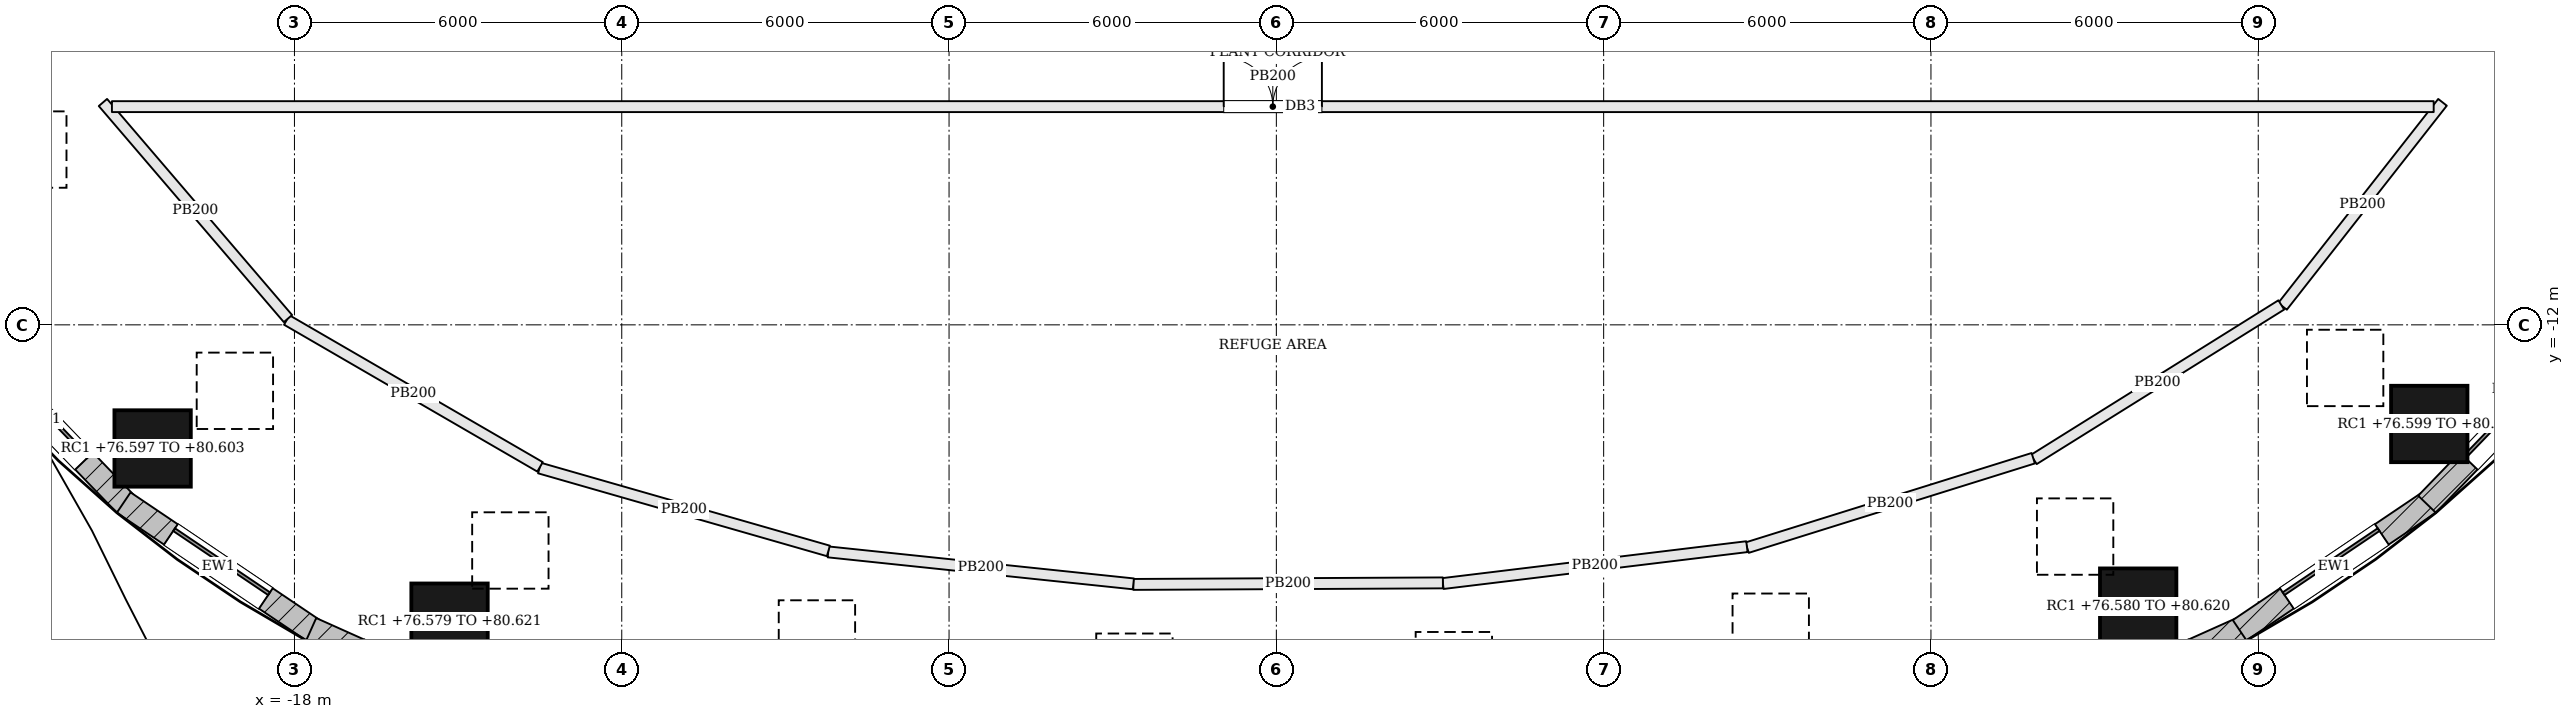
"""IFC4 building model, lengths in metres.
Left out: names, types, materials, properties, quantities, classifications, styles, units other than length and angle.
Written with IfcOpenShell. Run it as: python <this file> out.ifc"""

import sys

from ifc_helpers import new_model, si_unit, direction, frame, frame_2d, origin, origin_2d, place, context, subcontext, project, spatial, rectangle, extrude, element, fill, save


model = new_model("IFC4")
c1 = context("Model", 3, precision=1e-05, world=origin(), true_north=direction((0.0, 1.0)))
c2 = subcontext(c1, "Body", "Model", "MODEL_VIEW")
j1 = project(units=[si_unit("LENGTHUNIT", "METRE"), si_unit("PLANEANGLEUNIT", "RADIAN")], contexts=[c1])
p1 = place(None, origin())
s1 = spatial("IfcSite", under=j1, at=p1, CompositionType="ELEMENT")
p2 = place(p1, origin())
s2 = spatial("IfcBuilding", under=s1, at=p2, CompositionType="ELEMENT")
p3 = place(p2, frame((0.0, 0.0, 77.1)))
s3 = spatial("IfcBuildingStorey", under=s2, at=p3, CompositionType="ELEMENT", Elevation=77.1)
p4 = place(p3, frame((-24.676, -9.483, -0.49), z_axis=(0.406404807836, 0.157350047865, 0.900042273787), x_axis=(-0.361058075799, 0.932543331915, 0.0)))
e1 = element("IfcColumn", 1, at=p4, inside=s3, PredefinedType="COLUMN", context=c2, shape_type="SweptSolid", body=[
    extrude(rectangle(XDim=1.4, YDim=1.4, at=origin_2d()), origin(), (0.0, 0.0, 1.0), 4.422),
])
p5 = place(p3, frame((-20.6, -14.266, -0.503), z_axis=(0.342028722552, 0.239757870916, 0.908588199507), x_axis=(-0.574004932865, 0.818851840718, 0.0)))
e2 = element("IfcColumn", 2, at=p5, inside=s3, PredefinedType="COLUMN", context=c2, shape_type="SweptSolid", body=[
    extrude(rectangle(XDim=1.4, YDim=1.4, at=origin_2d()), origin(), (0.0, 0.0, 1.0), 4.409),
])
p6 = place(p3, frame((-15.157, -17.441, -0.521), z_axis=(0.253907371745, 0.297161134657, 0.920448970135), x_axis=(-0.760269764075, 0.649607485974, 0.0)))
e3 = element("IfcColumn", 3, at=p6, inside=s3, PredefinedType="COLUMN", context=c2, shape_type="SweptSolid", body=[
    extrude(rectangle(XDim=1.4, YDim=1.4, at=origin_2d()), origin(), (0.0, 0.0, 1.0), 4.391),
])
p7 = place(p3, frame((-9.094, -19.192, -0.541), z_axis=(0.15334867667, 0.329320740959, 0.931682366978), x_axis=(-0.906535510121, 0.422129564104, 0.0)))
e4 = element("IfcColumn", 4, at=p7, inside=s3, PredefinedType="COLUMN", context=c2, shape_type="SweptSolid", body=[
    extrude(rectangle(XDim=1.4, YDim=1.4, at=origin_2d()), origin(), (0.0, 0.0, 1.0), 4.381),
])
p8 = place(p3, frame((-2.811, -19.854, -0.553), z_axis=(0.047767571246, 0.341962239014, 0.938498847216), x_axis=(-0.990384307253, 0.138343499838, 0.0)))
e5 = element("IfcColumn", 5, at=p8, inside=s3, PredefinedType="COLUMN", context=c2, shape_type="SweptSolid", body=[
    extrude(rectangle(XDim=1.4, YDim=1.4, at=origin_2d()), origin(), (0.0, 0.0, 1.0), 4.375),
])
p9 = place(p3, frame((3.509, -19.824, -0.553), z_axis=(-0.058291782188, 0.341327670053, 0.938135112756), x_axis=(-0.985728602585, -0.168342276467, 0.0)))
e6 = element("IfcColumn", 6, at=p9, inside=s3, PredefinedType="COLUMN", context=c2, shape_type="SweptSolid", body=[
    extrude(rectangle(XDim=1.4, YDim=1.4, at=origin_2d()), origin(), (0.0, 0.0, 1.0), 4.377),
])
p10 = place(p3, frame((9.78, -19.058, -0.539), z_axis=(-0.163654041419, 0.327085196844, 0.930716191292), x_axis=(-0.894305276314, -0.447457341829, 0.0)))
e7 = element("IfcColumn", 7, at=p10, inside=s3, PredefinedType="COLUMN", context=c2, shape_type="SweptSolid", body=[
    extrude(rectangle(XDim=1.4, YDim=1.4, at=origin_2d()), origin(), (0.0, 0.0, 1.0), 4.381),
])
p11 = place(p3, frame((15.799, -17.165, -0.52), z_axis=(-0.263090632585, 0.292205625505, 0.919455921439), x_axis=(-0.743160626591, -0.669113057028, 0.0)))
e8 = element("IfcColumn", 8, at=p11, inside=s3, PredefinedType="COLUMN", context=c2, shape_type="SweptSolid", body=[
    extrude(rectangle(XDim=1.4, YDim=1.4, at=origin_2d()), origin(), (0.0, 0.0, 1.0), 4.394),
])
p12 = place(p3, frame((21.135, -13.817, -0.501), z_axis=(-0.349660781427, 0.232848835763, 0.907479342804), x_axis=(-0.554274366932, -0.832334023191, 0.0)))
e9 = element("IfcColumn", 9, at=p12, inside=s3, PredefinedType="COLUMN", context=c2, shape_type="SweptSolid", body=[
    extrude(rectangle(XDim=1.4, YDim=1.4, at=origin_2d()), origin(), (0.0, 0.0, 1.0), 4.41),
])
p13 = place(p3, frame((-24.077, -12.194, 0.0), z_axis=(0.0, 0.0, 1.0), x_axis=(0.69406513137, -0.719912212298, 0.0)))
e10 = element("IfcWall", 10, at=p13, inside=s3, PredefinedType="SOLIDWALL", context=c2, shape_type="SweptSolid", body=[
    extrude(rectangle(XDim=4.298, YDim=0.45, at=frame_2d((2.149, 0.0))), origin(), (0.0, 0.0, 1.0), 4.3),
])
p14 = place(p13, frame((1.099, 0.0, 1.2)))
e11 = element("IfcOpeningElement", 11, at=p14, cuts=e10, PredefinedType="OPENING", context=c2, shape_type="SweptSolid", body=[
    extrude(rectangle(XDim=2.1, YDim=1.8, at=frame_2d((1.05, 0.9))), frame((0.0, 0.235, 0.0), z_axis=(0.0, -1.0, 0.0), x_axis=(1.0, 0.0, 0.0)), (0.0, 0.0, 1.0), 0.47),
])
p15 = place(p3, frame((-21.13, -15.258, 0.0), z_axis=(0.0, 0.0, 1.0), x_axis=(0.829077786947, -0.559133278557, 0.0)))
e12 = element("IfcWall", 12, at=p15, inside=s3, PredefinedType="SOLIDWALL", context=c2, shape_type="SweptSolid", body=[
    extrude(rectangle(XDim=4.187, YDim=0.45, at=frame_2d((2.093, 0.0))), origin(), (0.0, 0.0, 1.0), 4.3),
])
p16 = place(p15, frame((1.043, 0.0, 1.2)))
e13 = element("IfcOpeningElement", 13, at=p16, cuts=e12, PredefinedType="OPENING", context=c2, shape_type="SweptSolid", body=[
    extrude(rectangle(XDim=2.1, YDim=1.8, at=frame_2d((1.05, 0.9))), frame((0.0, 0.235, 0.0), z_axis=(0.0, -1.0, 0.0), x_axis=(1.0, 0.0, 0.0)), (0.0, 0.0, 1.0), 0.47),
])
p17 = place(p3, frame((-17.693, -17.58, 0.0), z_axis=(0.0, 0.0, 1.0), x_axis=(0.912580432801, -0.408897240966, 0.0)))
e14 = element("IfcWall", 14, at=p17, inside=s3, PredefinedType="SOLIDWALL", context=c2, shape_type="SweptSolid", body=[
    extrude(rectangle(XDim=4.021, YDim=0.45, at=frame_2d((2.01, 0.0))), origin(), (0.0, 0.0, 1.0), 4.3),
])
p18 = place(p17, frame((0.96, 0.0, 1.2)))
e15 = element("IfcOpeningElement", 15, at=p18, cuts=e14, PredefinedType="OPENING", context=c2, shape_type="SweptSolid", body=[
    extrude(rectangle(XDim=2.1, YDim=1.8, at=frame_2d((1.05, 0.9))), frame((0.0, 0.235, 0.0), z_axis=(0.0, -1.0, 0.0), x_axis=(1.0, 0.0, 0.0)), (0.0, 0.0, 1.0), 0.47),
])
p19 = place(p3, frame((14.024, -19.224, 0.0), z_axis=(0.0, 0.0, 1.0), x_axis=(0.912580432801, 0.408897240966, 0.0)))
e16 = element("IfcWall", 16, at=p19, inside=s3, PredefinedType="SOLIDWALL", context=c2, shape_type="SweptSolid", body=[
    extrude(rectangle(XDim=4.021, YDim=0.45, at=frame_2d((2.01, 0.0))), origin(), (0.0, 0.0, 1.0), 4.3),
])
p20 = place(p19, frame((0.96, 0.0, 1.2)))
e17 = element("IfcOpeningElement", 17, at=p20, cuts=e16, PredefinedType="OPENING", context=c2, shape_type="SweptSolid", body=[
    extrude(rectangle(XDim=2.1, YDim=1.8, at=frame_2d((1.05, 0.9))), frame((0.0, 0.235, 0.0), z_axis=(0.0, -1.0, 0.0), x_axis=(1.0, 0.0, 0.0)), (0.0, 0.0, 1.0), 0.47),
])
p21 = place(p3, frame((17.659, -17.598, 0.0), z_axis=(0.0, 0.0, 1.0), x_axis=(0.829077786947, 0.559133278557, 0.0)))
e18 = element("IfcWall", 18, at=p21, inside=s3, PredefinedType="SOLIDWALL", context=c2, shape_type="SweptSolid", body=[
    extrude(rectangle(XDim=4.187, YDim=0.45, at=frame_2d((2.093, 0.0))), origin(), (0.0, 0.0, 1.0), 4.3),
])
p22 = place(p21, frame((1.043, 0.0, 1.2)))
e19 = element("IfcOpeningElement", 19, at=p22, cuts=e18, PredefinedType="OPENING", context=c2, shape_type="SweptSolid", body=[
    extrude(rectangle(XDim=2.1, YDim=1.8, at=frame_2d((1.05, 0.9))), frame((0.0, 0.235, 0.0), z_axis=(0.0, -1.0, 0.0), x_axis=(1.0, 0.0, 0.0)), (0.0, 0.0, 1.0), 0.47),
])
p23 = place(p3, frame((21.094, -15.288, 0.0), z_axis=(0.0, 0.0, 1.0), x_axis=(0.69406513137, 0.719912212298, 0.0)))
e20 = element("IfcWall", 20, at=p23, inside=s3, PredefinedType="SOLIDWALL", context=c2, shape_type="SweptSolid", body=[
    extrude(rectangle(XDim=4.298, YDim=0.45, at=frame_2d((2.149, 0.0))), origin(), (0.0, 0.0, 1.0), 4.3),
])
p24 = place(p23, frame((1.099, 0.0, 1.2)))
e21 = element("IfcOpeningElement", 21, at=p24, cuts=e20, PredefinedType="OPENING", context=c2, shape_type="SweptSolid", body=[
    extrude(rectangle(XDim=2.1, YDim=1.8, at=frame_2d((1.05, 0.9))), frame((0.0, 0.235, 0.0), z_axis=(0.0, -1.0, 0.0), x_axis=(1.0, 0.0, 0.0)), (0.0, 0.0, 1.0), 0.47),
])
p25 = place(p3, frame((-24.085, -12.294, 4.5), z_axis=(0.0, 0.0, 1.0), x_axis=(0.69408561192, -0.719892466501, 0.0)))
e22 = element("IfcWall", 22, at=p25, inside=s3, PredefinedType="PARAPET", context=c2, shape_type="SweptSolid", body=[
    extrude(rectangle(XDim=2.261, YDim=0.3, at=frame_2d((1.13, 0.0))), origin(), (0.0, 0.0, 1.0), 1.1),
])
p26 = place(p3, frame((21.378, -7.921, 0.0), z_axis=(0.0, 0.0, 1.0), x_axis=(-0.61707944402, -0.786900857649, 0.0)))
e23 = element("IfcWall", 23, at=p26, inside=s3, PredefinedType="PARTITIONING", context=c2, shape_type="SweptSolid", body=[
    extrude(rectangle(XDim=4.753, YDim=0.2, at=frame_2d((2.376, 0.0))), origin(), (0.0, 0.0, 1.0), 4.3),
])
p27 = place(p3, frame((18.422, -11.635, 0.0), z_axis=(0.0, 0.0, 1.0), x_axis=(-0.848223876435, -0.529637853108, 0.0)))
e24 = element("IfcWall", 24, at=p27, inside=s3, PredefinedType="PARTITIONING", context=c2, shape_type="SweptSolid", body=[
    extrude(rectangle(XDim=5.349, YDim=0.2, at=frame_2d((2.674, 0.0))), origin(), (0.0, 0.0, 1.0), 4.3),
])
p28 = place(p3, frame((13.875, -14.445, 0.0), z_axis=(0.0, 0.0, 1.0), x_axis=(-0.954489463941, -0.298244636541, 0.0)))
e25 = element("IfcWall", 25, at=p28, inside=s3, PredefinedType="PARTITIONING", context=c2, shape_type="SweptSolid", body=[
    extrude(rectangle(XDim=5.495, YDim=0.2, at=frame_2d((2.748, 0.0))), origin(), (0.0, 0.0, 1.0), 4.3),
])
p29 = place(p3, frame((8.626, -16.066, 0.0), z_axis=(0.0, 0.0, 1.0), x_axis=(-0.992720392358, -0.120441780942, 0.0)))
e26 = element("IfcWall", 26, at=p29, inside=s3, PredefinedType="PARTITIONING", context=c2, shape_type="SweptSolid", body=[
    extrude(rectangle(XDim=5.613, YDim=0.2, at=frame_2d((2.806, 0.0))), origin(), (0.0, 0.0, 1.0), 4.3),
])
p30 = place(p3, frame((3.053, -16.73, 0.0), z_axis=(0.0, 0.0, 1.0), x_axis=(-0.999987762334, -0.004947239951, 0.0)))
e27 = element("IfcWall", 27, at=p30, inside=s3, PredefinedType="PARTITIONING", context=c2, shape_type="SweptSolid", body=[
    extrude(rectangle(XDim=5.675, YDim=0.2, at=frame_2d((2.837, 0.0))), origin(), (0.0, 0.0, 1.0), 4.3),
])
p31 = place(p3, frame((-2.621, -16.748, 0.0), z_axis=(0.0, 0.0, 1.0), x_axis=(-0.99455907377, 0.104174127222, 0.0)))
e28 = element("IfcWall", 28, at=p31, inside=s3, PredefinedType="PARTITIONING", context=c2, shape_type="SweptSolid", body=[
    extrude(rectangle(XDim=5.625, YDim=0.2, at=frame_2d((2.812, 0.0))), origin(), (0.0, 0.0, 1.0), 4.3),
])
p32 = place(p3, frame((-8.212, -16.144, 0.0), z_axis=(0.0, 0.0, 1.0), x_axis=(-0.961229052449, 0.275751171762, 0.0)))
e29 = element("IfcWall", 29, at=p32, inside=s3, PredefinedType="PARTITIONING", context=c2, shape_type="SweptSolid", body=[
    extrude(rectangle(XDim=5.509, YDim=0.2, at=frame_2d((2.754, 0.0))), origin(), (0.0, 0.0, 1.0), 4.3),
])
p33 = place(p3, frame((-13.498, -14.603, 0.0), z_axis=(0.0, 0.0, 1.0), x_axis=(-0.865099094035, 0.501600994317, 0.0)))
e30 = element("IfcWall", 30, at=p33, inside=s3, PredefinedType="PARTITIONING", context=c2, shape_type="SweptSolid", body=[
    extrude(rectangle(XDim=5.367, YDim=0.2, at=frame_2d((2.684, 0.0))), origin(), (0.0, 0.0, 1.0), 4.3),
])
p34 = place(p3, frame((-18.119, -11.885, 0.0), z_axis=(0.0, 0.0, 1.0), x_axis=(-0.650459744862, 0.759540729858, 0.0)))
e31 = element("IfcWall", 31, at=p34, inside=s3, PredefinedType="PARTITIONING", context=c2, shape_type="SweptSolid", body=[
    extrude(rectangle(XDim=5.215, YDim=0.2, at=frame_2d((2.607, 0.0))), origin(), (0.0, 0.0, 1.0), 4.3),
])
p35 = place(p3, frame((-21.346, -8.0, 0.0), z_axis=(0.0, 0.0, 1.0), x_axis=(1.0, 0.0, 0.0)))
e32 = element("IfcWall", 32, at=p35, inside=s3, PredefinedType="PARTITIONING", context=c2, shape_type="SweptSolid", body=[
    extrude(rectangle(XDim=42.562, YDim=0.2, at=frame_2d((21.281, 0.0))), origin(), (0.0, 0.0, 1.0), 4.3),
])
p36 = place(p35, frame((20.381, 0.0, 0.0)))
e33 = element("IfcOpeningElement", 33, at=p36, cuts=e32, PredefinedType="OPENING", context=c2, shape_type="SweptSolid", body=[
    extrude(rectangle(XDim=1.8, YDim=2.1, at=frame_2d((0.9, 1.05))), frame((0.0, 0.11, 0.0), z_axis=(0.0, -1.0, 0.0), x_axis=(1.0, 0.0, 0.0)), (0.0, 0.0, 1.0), 0.22),
])
p37 = place(p14, origin())
e34 = element("IfcWindow", 34, at=p37, inside=s3, PartitioningType="SINGLE_PANEL", PredefinedType="WINDOW", context=c2, shape_type="SweptSolid", body=[
    extrude(rectangle(XDim=2.1, YDim=1.8, at=frame_2d((1.05, 0.9))), frame((0.0, 0.135, 0.0), z_axis=(0.0, -1.0, 0.0), x_axis=(1.0, 0.0, 0.0)), (0.0, 0.0, 1.0), 0.06),
])
fill(e11, e34)
p38 = place(p16, origin())
e35 = element("IfcWindow", 35, at=p38, inside=s3, PartitioningType="SINGLE_PANEL", PredefinedType="WINDOW", context=c2, shape_type="SweptSolid", body=[
    extrude(rectangle(XDim=2.1, YDim=1.8, at=frame_2d((1.05, 0.9))), frame((0.0, 0.135, 0.0), z_axis=(0.0, -1.0, 0.0), x_axis=(1.0, 0.0, 0.0)), (0.0, 0.0, 1.0), 0.06),
])
fill(e13, e35)
p39 = place(p22, origin())
e36 = element("IfcWindow", 36, at=p39, inside=s3, PartitioningType="SINGLE_PANEL", PredefinedType="WINDOW", context=c2, shape_type="SweptSolid", body=[
    extrude(rectangle(XDim=2.1, YDim=1.8, at=frame_2d((1.05, 0.9))), frame((0.0, 0.135, 0.0), z_axis=(0.0, -1.0, 0.0), x_axis=(1.0, 0.0, 0.0)), (0.0, 0.0, 1.0), 0.06),
])
fill(e19, e36)
p40 = place(p24, origin())
e37 = element("IfcWindow", 37, at=p40, inside=s3, PartitioningType="SINGLE_PANEL", PredefinedType="WINDOW", context=c2, shape_type="SweptSolid", body=[
    extrude(rectangle(XDim=2.1, YDim=1.8, at=frame_2d((1.05, 0.9))), frame((0.0, 0.135, 0.0), z_axis=(0.0, -1.0, 0.0), x_axis=(1.0, 0.0, 0.0)), (0.0, 0.0, 1.0), 0.06),
])
fill(e21, e37)
p41 = place(p36, origin())
e38 = element("IfcDoor", 38, at=p41, inside=s3, OperationType="DOUBLE_DOOR_SINGLE_SWING", PredefinedType="DOOR", context=c2, shape_type="SweptSolid", body=[
    extrude(rectangle(XDim=1.8, YDim=2.1, at=frame_2d((0.9, 1.05))), frame((0.0, 0.025, 0.0), z_axis=(0.0, -1.0, 0.0), x_axis=(1.0, 0.0, 0.0)), (0.0, 0.0, 1.0), 0.05),
])
fill(e33, e38)
save(model, sys.argv[1])
